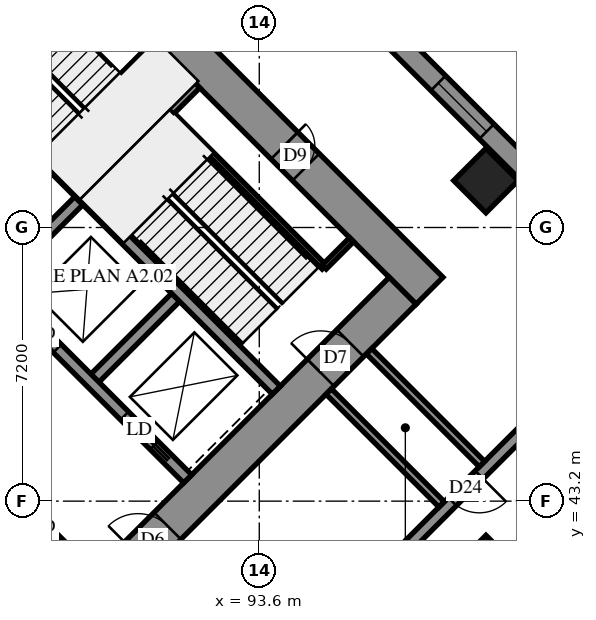
"""IFC4 building model, lengths in metres.
Left out: names, types, materials, properties, quantities, classifications, styles, units other than length and angle.
Written with IfcOpenShell. Run it as: python <this file> out.ifc"""

import sys

from ifc_helpers import new_model, si_unit, direction, frame, frame_2d, origin, origin_2d, place, context, subcontext, project, spatial, polyline, rectangle, outline, extrude, element, fill, save


model = new_model("IFC4")
c1 = context("Model", 3, precision=1e-05, world=origin(), true_north=direction((0.0, 1.0)))
c2 = subcontext(c1, "Body", "Model", "MODEL_VIEW")
j1 = project(units=[si_unit("LENGTHUNIT", "METRE"), si_unit("PLANEANGLEUNIT", "RADIAN")], contexts=[c1])
p1 = place(None, origin())
s1 = spatial("IfcSite", under=j1, at=p1, CompositionType="ELEMENT")
p2 = place(p1, origin())
s2 = spatial("IfcBuilding", under=s1, at=p2, CompositionType="ELEMENT")
p3 = place(p2, origin())
s3 = spatial("IfcBuildingStorey", under=s2, at=p3, CompositionType="ELEMENT", Elevation=0.0)
for number, where, z_axis, x_axis in (
    (1, (99.565, 51.635, 0.0), (0.0, 0.0, 1.0), (0.707, -0.707, 0.0)),
    (2, (99.565, 41.453, 0.0), (0.0, 0.0, 1.0), (0.707, -0.707, 0.0)),
):
    element("IfcColumn", number, at=place(p3, frame(where, z_axis=z_axis, x_axis=x_axis)), inside=s3, PredefinedType="COLUMN", context=c2, shape_type="SweptSolid", body=[
        extrude(rectangle(XDim=1.2, YDim=1.2, at=origin_2d()), origin(), (0.0, 0.0, 1.0), 5.6),
    ])
p4 = place(p3, frame((86.483, 60.333, -0.4), z_axis=(0.0, 0.0, 1.0), x_axis=(0.70710983, -0.7071037324, 0.0)))
e3 = element("IfcWall", 3, at=p4, inside=s3, PredefinedType="SHEAR", context=c2, shape_type="SweptSolid", body=[
    extrude(rectangle(XDim=16.4, YDim=1.0, at=frame_2d((8.2, 0.0))), origin(), (0.0, 0.0, 1.0), 5.3),
])
p5 = place(p4, frame((11.0, 0.0, 0.4)))
e4 = element("IfcOpeningElement", 4, at=p5, cuts=e3, PredefinedType="OPENING", context=c2, shape_type="SweptSolid", body=[
    extrude(rectangle(XDim=0.8, YDim=2.1, at=frame_2d((0.4, 1.05))), frame((0.0, 0.51, 0.0), z_axis=(0.0, -1.0, 0.0), x_axis=(1.0, 0.0, 0.0)), (0.0, 0.0, 1.0), 1.02),
])
p6 = place(p3, frame((87.19, 38.554, -0.4), z_axis=(0.0, 0.0, 1.0), x_axis=(0.707103309, 0.7071102534, 0.0)))
e5 = element("IfcWall", 5, at=p6, inside=s3, PredefinedType="SHEAR", context=c2, shape_type="SweptSolid", body=[
    extrude(rectangle(XDim=14.4, YDim=1.0, at=frame_2d((7.2, 0.0))), origin(), (0.0, 0.0, 1.0), 5.3),
])
p7 = place(p6, frame((4.55, 0.0, 0.4)))
e6 = element("IfcOpeningElement", 6, at=p7, cuts=e5, PredefinedType="OPENING", context=c2, shape_type="SweptSolid", body=[
    extrude(rectangle(XDim=1.1, YDim=2.1, at=frame_2d((0.55, 1.05))), frame((0.0, 0.51, 0.0), z_axis=(0.0, -1.0, 0.0), x_axis=(1.0, 0.0, 0.0)), (0.0, 0.0, 1.0), 1.02),
])
p8 = place(p6, frame((11.35, 0.0, 0.4)))
e7 = element("IfcOpeningElement", 7, at=p8, cuts=e5, PredefinedType="OPENING", context=c2, shape_type="SweptSolid", body=[
    extrude(rectangle(XDim=1.1, YDim=2.1, at=frame_2d((0.55, 1.05))), frame((0.0, 0.51, 0.0), z_axis=(0.0, -1.0, 0.0), x_axis=(1.0, 0.0, 0.0)), (0.0, 0.0, 1.0), 1.02),
])
for number, where, z_axis, x_axis in (
    (8, (86.625, 48.878, 0.0), (0.0, 0.0, 1.0), (0.707, 0.707, 0.0)),
    (9, (89.17, 46.332, 0.0), (0.0, 0.0, 1.0), (0.707, 0.707, 0.0)),
):
    element("IfcWall", number, at=place(p3, frame(where, z_axis=z_axis, x_axis=x_axis)), inside=s3, PredefinedType="SOLIDWALL", context=c2, shape_type="SweptSolid", body=[
        extrude(rectangle(XDim=3.3, YDim=0.3, at=frame_2d((1.65, 0.0))), origin(), (0.0, 0.0, 1.0), 5.6),
    ])
p9 = place(p3, frame((78.988, 51.423, 0.0), z_axis=(0.0, 0.0, 1.0), x_axis=(0.7071067812, -0.7071067812, 0.0)))
e10 = element("IfcWall", 10, at=p9, inside=s3, PredefinedType="SOLIDWALL", context=c2, shape_type="SweptSolid", body=[
    extrude(rectangle(XDim=14.4, YDim=0.3, at=frame_2d((7.2, 0.0))), origin(), (0.0, 0.0, 1.0), 5.6),
])
p10 = place(p9, frame((1.25, 0.0, 0.0)))
e11 = element("IfcOpeningElement", 11, at=p10, cuts=e10, PredefinedType="OPENING", context=c2, shape_type="SweptSolid", body=[
    extrude(rectangle(XDim=1.1, YDim=2.1, at=frame_2d((0.55, 1.05))), frame((0.0, 0.16, 0.0), z_axis=(0.0, -1.0, 0.0), x_axis=(1.0, 0.0, 0.0)), (0.0, 0.0, 1.0), 0.32),
])
p11 = place(p9, frame((4.85, 0.0, 0.0)))
e12 = element("IfcOpeningElement", 12, at=p11, cuts=e10, PredefinedType="OPENING", context=c2, shape_type="SweptSolid", body=[
    extrude(rectangle(XDim=1.1, YDim=2.1, at=frame_2d((0.55, 1.05))), frame((0.0, 0.16, 0.0), z_axis=(0.0, -1.0, 0.0), x_axis=(1.0, 0.0, 0.0)), (0.0, 0.0, 1.0), 0.32),
])
p12 = place(p9, frame((8.45, 0.0, 0.0)))
e13 = element("IfcOpeningElement", 13, at=p12, cuts=e10, PredefinedType="OPENING", context=c2, shape_type="SweptSolid", body=[
    extrude(rectangle(XDim=1.1, YDim=2.1, at=frame_2d((0.55, 1.05))), frame((0.0, 0.16, 0.0), z_axis=(0.0, -1.0, 0.0), x_axis=(1.0, 0.0, 0.0)), (0.0, 0.0, 1.0), 0.32),
])
p13 = place(p9, frame((12.05, 0.0, 0.0)))
e14 = element("IfcOpeningElement", 14, at=p13, cuts=e10, PredefinedType="OPENING", context=c2, shape_type="SweptSolid", body=[
    extrude(rectangle(XDim=1.1, YDim=2.1, at=frame_2d((0.55, 1.05))), frame((0.0, 0.16, 0.0), z_axis=(0.0, -1.0, 0.0), x_axis=(1.0, 0.0, 0.0)), (0.0, 0.0, 1.0), 0.32),
])
p14 = place(p3, frame((81.534, 53.969, 0.0), z_axis=(0.0, 0.0, 1.0), x_axis=(0.707103309, -0.7071102534, 0.0)))
e15 = element("IfcWall", 15, at=p14, inside=s3, PredefinedType="SOLIDWALL", context=c2, shape_type="SweptSolid", body=[
    extrude(rectangle(XDim=14.4, YDim=0.3, at=frame_2d((7.2, 0.0))), origin(), (0.0, 0.0, 1.0), 5.6),
])
p15 = place(p14, frame((1.25, 0.0, 0.0)))
e16 = element("IfcOpeningElement", 16, at=p15, cuts=e15, PredefinedType="OPENING", context=c2, shape_type="SweptSolid", body=[
    extrude(rectangle(XDim=1.1, YDim=2.1, at=frame_2d((0.55, 1.05))), frame((0.0, 0.16, 0.0), z_axis=(0.0, -1.0, 0.0), x_axis=(1.0, 0.0, 0.0)), (0.0, 0.0, 1.0), 0.32),
])
p16 = place(p14, frame((4.85, 0.0, 0.0)))
e17 = element("IfcOpeningElement", 17, at=p16, cuts=e15, PredefinedType="OPENING", context=c2, shape_type="SweptSolid", body=[
    extrude(rectangle(XDim=1.1, YDim=2.1, at=frame_2d((0.55, 1.05))), frame((0.0, 0.16, 0.0), z_axis=(0.0, -1.0, 0.0), x_axis=(1.0, 0.0, 0.0)), (0.0, 0.0, 1.0), 0.32),
])
p17 = place(p14, frame((8.45, 0.0, 0.0)))
e18 = element("IfcOpeningElement", 18, at=p17, cuts=e15, PredefinedType="OPENING", context=c2, shape_type="SweptSolid", body=[
    extrude(rectangle(XDim=1.1, YDim=2.1, at=frame_2d((0.55, 1.05))), frame((0.0, 0.16, 0.0), z_axis=(0.0, -1.0, 0.0), x_axis=(1.0, 0.0, 0.0)), (0.0, 0.0, 1.0), 0.32),
])
p18 = place(p14, frame((12.05, 0.0, 0.0)))
e19 = element("IfcOpeningElement", 19, at=p18, cuts=e15, PredefinedType="OPENING", context=c2, shape_type="SweptSolid", body=[
    extrude(rectangle(XDim=1.1, YDim=2.1, at=frame_2d((0.55, 1.05))), frame((0.0, 0.16, 0.0), z_axis=(0.0, -1.0, 0.0), x_axis=(1.0, 0.0, 0.0)), (0.0, 0.0, 1.0), 0.32),
])
for number, where, z_axis, x_axis in (
    (20, (83.867, 56.302, 0.0), (0.0, 0.0, 1.0), (0.707, -0.707, 0.0)),
    (21, (88.958, 51.211, 0.0), (0.0, 0.0, 1.0), (0.707, -0.707, 0.0)),
):
    element("IfcWall", number, at=place(p3, frame(where, z_axis=z_axis, x_axis=x_axis)), inside=s3, PredefinedType="SOLIDWALL", context=c2, shape_type="SweptSolid", body=[
        extrude(rectangle(XDim=7.2, YDim=0.3, at=frame_2d((3.6, 0.0))), origin(), (0.0, 0.0, 1.0), 5.6),
    ])
p19 = place(p3, frame((88.958, 51.211, 0.0), z_axis=(0.0, 0.0, 1.0), x_axis=(0.7071067812, 0.7071067812, 0.0)))
e22 = element("IfcWall", 22, at=p19, inside=s3, PredefinedType="SOLIDWALL", context=c2, shape_type="SweptSolid", body=[
    extrude(rectangle(XDim=4.2, YDim=0.3, at=frame_2d((2.1, 0.0))), origin(), (0.0, 0.0, 1.0), 5.6),
])
p20 = place(p3, frame((117.843, 34.665, 0.0), z_axis=(0.0, 0.0, 1.0), x_axis=(-0.7071067812, 0.7071067812, 0.0)))
e23 = element("IfcWall", 23, at=p20, inside=s3, PredefinedType="SOLIDWALL", context=c2, shape_type="SweptSolid", body=[
    extrude(outline(polyline([(-0.275, -0.275), (54.222, -0.275), (53.994, 0.275), (0.275, 0.275), (-0.275, -0.275)])), origin(), (0.0, 0.0, 1.0), 5.6),
])
p21 = place(p20, frame((0.8, 0.0, 0.7)))
e24 = element("IfcOpeningElement", 24, at=p21, cuts=e23, PredefinedType="OPENING", context=c2, shape_type="SweptSolid", body=[
    extrude(rectangle(XDim=1.8, YDim=3.4, at=frame_2d((0.9, 1.7))), frame((0.0, 0.285, 0.0), z_axis=(0.0, -1.0, 0.0), x_axis=(1.0, 0.0, 0.0)), (0.0, 0.0, 1.0), 0.57),
])
p22 = place(p20, frame((4.225, 0.0, 0.7)))
e25 = element("IfcOpeningElement", 25, at=p22, cuts=e23, PredefinedType="OPENING", context=c2, shape_type="SweptSolid", body=[
    extrude(rectangle(XDim=1.8, YDim=3.4, at=frame_2d((0.9, 1.7))), frame((0.0, 0.285, 0.0), z_axis=(0.0, -1.0, 0.0), x_axis=(1.0, 0.0, 0.0)), (0.0, 0.0, 1.0), 0.57),
])
p23 = place(p20, frame((7.825, 0.0, 0.7)))
e26 = element("IfcOpeningElement", 26, at=p23, cuts=e23, PredefinedType="OPENING", context=c2, shape_type="SweptSolid", body=[
    extrude(rectangle(XDim=1.8, YDim=3.4, at=frame_2d((0.9, 1.7))), frame((0.0, 0.285, 0.0), z_axis=(0.0, -1.0, 0.0), x_axis=(1.0, 0.0, 0.0)), (0.0, 0.0, 1.0), 0.57),
])
p24 = place(p20, frame((11.425, 0.0, 0.7)))
e27 = element("IfcOpeningElement", 27, at=p24, cuts=e23, PredefinedType="OPENING", context=c2, shape_type="SweptSolid", body=[
    extrude(rectangle(XDim=1.8, YDim=3.4, at=frame_2d((0.9, 1.7))), frame((0.0, 0.285, 0.0), z_axis=(0.0, -1.0, 0.0), x_axis=(1.0, 0.0, 0.0)), (0.0, 0.0, 1.0), 0.57),
])
p25 = place(p20, frame((15.025, 0.0, 0.7)))
e28 = element("IfcOpeningElement", 28, at=p25, cuts=e23, PredefinedType="OPENING", context=c2, shape_type="SweptSolid", body=[
    extrude(rectangle(XDim=1.8, YDim=3.4, at=frame_2d((0.9, 1.7))), frame((0.0, 0.285, 0.0), z_axis=(0.0, -1.0, 0.0), x_axis=(1.0, 0.0, 0.0)), (0.0, 0.0, 1.0), 0.57),
])
p26 = place(p20, frame((22.225, 0.0, 0.7)))
e29 = element("IfcOpeningElement", 29, at=p26, cuts=e23, PredefinedType="OPENING", context=c2, shape_type="SweptSolid", body=[
    extrude(rectangle(XDim=1.8, YDim=3.4, at=frame_2d((0.9, 1.7))), frame((0.0, 0.285, 0.0), z_axis=(0.0, -1.0, 0.0), x_axis=(1.0, 0.0, 0.0)), (0.0, 0.0, 1.0), 0.57),
])
p27 = place(p20, frame((25.825, 0.0, 0.7)))
e30 = element("IfcOpeningElement", 30, at=p27, cuts=e23, PredefinedType="OPENING", context=c2, shape_type="SweptSolid", body=[
    extrude(rectangle(XDim=1.8, YDim=3.4, at=frame_2d((0.9, 1.7))), frame((0.0, 0.285, 0.0), z_axis=(0.0, -1.0, 0.0), x_axis=(1.0, 0.0, 0.0)), (0.0, 0.0, 1.0), 0.57),
])
p28 = place(p20, frame((29.425, 0.0, 0.7)))
e31 = element("IfcOpeningElement", 31, at=p28, cuts=e23, PredefinedType="OPENING", context=c2, shape_type="SweptSolid", body=[
    extrude(rectangle(XDim=1.8, YDim=3.4, at=frame_2d((0.9, 1.7))), frame((0.0, 0.285, 0.0), z_axis=(0.0, -1.0, 0.0), x_axis=(1.0, 0.0, 0.0)), (0.0, 0.0, 1.0), 0.57),
])
p29 = place(p20, frame((33.025, 0.0, 0.7)))
e32 = element("IfcOpeningElement", 32, at=p29, cuts=e23, PredefinedType="OPENING", context=c2, shape_type="SweptSolid", body=[
    extrude(rectangle(XDim=1.8, YDim=3.4, at=frame_2d((0.9, 1.7))), frame((0.0, 0.285, 0.0), z_axis=(0.0, -1.0, 0.0), x_axis=(1.0, 0.0, 0.0)), (0.0, 0.0, 1.0), 0.57),
])
p30 = place(p20, frame((36.625, 0.0, 0.7)))
e33 = element("IfcOpeningElement", 33, at=p30, cuts=e23, PredefinedType="OPENING", context=c2, shape_type="SweptSolid", body=[
    extrude(rectangle(XDim=1.8, YDim=3.4, at=frame_2d((0.9, 1.7))), frame((0.0, 0.285, 0.0), z_axis=(0.0, -1.0, 0.0), x_axis=(1.0, 0.0, 0.0)), (0.0, 0.0, 1.0), 0.57),
])
p31 = place(p20, frame((40.225, 0.0, 0.7)))
e34 = element("IfcOpeningElement", 34, at=p31, cuts=e23, PredefinedType="OPENING", context=c2, shape_type="SweptSolid", body=[
    extrude(rectangle(XDim=1.8, YDim=3.4, at=frame_2d((0.9, 1.7))), frame((0.0, 0.285, 0.0), z_axis=(0.0, -1.0, 0.0), x_axis=(1.0, 0.0, 0.0)), (0.0, 0.0, 1.0), 0.57),
])
p32 = place(p20, frame((47.425, 0.0, 0.7)))
e35 = element("IfcOpeningElement", 35, at=p32, cuts=e23, PredefinedType="OPENING", context=c2, shape_type="SweptSolid", body=[
    extrude(rectangle(XDim=1.8, YDim=3.4, at=frame_2d((0.9, 1.7))), frame((0.0, 0.285, 0.0), z_axis=(0.0, -1.0, 0.0), x_axis=(1.0, 0.0, 0.0)), (0.0, 0.0, 1.0), 0.57),
])
p33 = place(p20, frame((51.06, 0.0, 0.7)))
e36 = element("IfcOpeningElement", 36, at=p33, cuts=e23, PredefinedType="OPENING", context=c2, shape_type="SweptSolid", body=[
    extrude(rectangle(XDim=1.8, YDim=3.4, at=frame_2d((0.9, 1.7))), frame((0.0, 0.285, 0.0), z_axis=(0.0, -1.0, 0.0), x_axis=(1.0, 0.0, 0.0)), (0.0, 0.0, 1.0), 0.57),
])
p34 = place(p3, frame((77.07, 42.275, 0.0), z_axis=(0.0, 0.0, 1.0), x_axis=(0.7071067812, -0.7071067812, 0.0)))
e37 = element("IfcWall", 37, at=p34, inside=s3, PredefinedType="SOLIDWALL", context=c2, shape_type="SweptSolid", body=[
    extrude(outline(polyline([(0.114, -0.275), (39.288, -0.275), (38.737, 0.275), (-0.114, 0.275), (0.114, -0.275)])), origin(), (0.0, 0.0, 1.0), 5.6),
])
p35 = place(p34, frame((2.837, 0.0, 0.7)))
e38 = element("IfcOpeningElement", 38, at=p35, cuts=e37, PredefinedType="OPENING", context=c2, shape_type="SweptSolid", body=[
    extrude(rectangle(XDim=1.8, YDim=3.4, at=frame_2d((0.9, 1.7))), frame((0.0, 0.285, 0.0), z_axis=(0.0, -1.0, 0.0), x_axis=(1.0, 0.0, 0.0)), (0.0, 0.0, 1.0), 0.57),
])
p36 = place(p34, frame((6.588, 0.0, 0.7)))
e39 = element("IfcOpeningElement", 39, at=p36, cuts=e37, PredefinedType="OPENING", context=c2, shape_type="SweptSolid", body=[
    extrude(rectangle(XDim=1.8, YDim=3.4, at=frame_2d((0.9, 1.7))), frame((0.0, 0.285, 0.0), z_axis=(0.0, -1.0, 0.0), x_axis=(1.0, 0.0, 0.0)), (0.0, 0.0, 1.0), 0.57),
])
p37 = place(p34, frame((10.188, 0.0, 0.7)))
e40 = element("IfcOpeningElement", 40, at=p37, cuts=e37, PredefinedType="OPENING", context=c2, shape_type="SweptSolid", body=[
    extrude(rectangle(XDim=1.8, YDim=3.4, at=frame_2d((0.9, 1.7))), frame((0.0, 0.285, 0.0), z_axis=(0.0, -1.0, 0.0), x_axis=(1.0, 0.0, 0.0)), (0.0, 0.0, 1.0), 0.57),
])
p38 = place(p34, frame((17.387, 0.0, 0.7)))
e41 = element("IfcOpeningElement", 41, at=p38, cuts=e37, PredefinedType="OPENING", context=c2, shape_type="SweptSolid", body=[
    extrude(rectangle(XDim=1.8, YDim=3.4, at=frame_2d((0.9, 1.7))), frame((0.0, 0.285, 0.0), z_axis=(0.0, -1.0, 0.0), x_axis=(1.0, 0.0, 0.0)), (0.0, 0.0, 1.0), 0.57),
])
p39 = place(p34, frame((20.988, 0.0, 0.7)))
e42 = element("IfcOpeningElement", 42, at=p39, cuts=e37, PredefinedType="OPENING", context=c2, shape_type="SweptSolid", body=[
    extrude(rectangle(XDim=1.8, YDim=3.4, at=frame_2d((0.9, 1.7))), frame((0.0, 0.285, 0.0), z_axis=(0.0, -1.0, 0.0), x_axis=(1.0, 0.0, 0.0)), (0.0, 0.0, 1.0), 0.57),
])
p40 = place(p34, frame((24.587, 0.0, 0.7)))
e43 = element("IfcOpeningElement", 43, at=p40, cuts=e37, PredefinedType="OPENING", context=c2, shape_type="SweptSolid", body=[
    extrude(rectangle(XDim=1.8, YDim=3.4, at=frame_2d((0.9, 1.7))), frame((0.0, 0.285, 0.0), z_axis=(0.0, -1.0, 0.0), x_axis=(1.0, 0.0, 0.0)), (0.0, 0.0, 1.0), 0.57),
])
p41 = place(p34, frame((28.188, 0.0, 0.7)))
e44 = element("IfcOpeningElement", 44, at=p41, cuts=e37, PredefinedType="OPENING", context=c2, shape_type="SweptSolid", body=[
    extrude(rectangle(XDim=1.8, YDim=3.4, at=frame_2d((0.9, 1.7))), frame((0.0, 0.285, 0.0), z_axis=(0.0, -1.0, 0.0), x_axis=(1.0, 0.0, 0.0)), (0.0, 0.0, 1.0), 0.57),
])
p42 = place(p34, frame((31.788, 0.0, 0.7)))
e45 = element("IfcOpeningElement", 45, at=p42, cuts=e37, PredefinedType="OPENING", context=c2, shape_type="SweptSolid", body=[
    extrude(rectangle(XDim=1.8, YDim=3.4, at=frame_2d((0.9, 1.7))), frame((0.0, 0.285, 0.0), z_axis=(0.0, -1.0, 0.0), x_axis=(1.0, 0.0, 0.0)), (0.0, 0.0, 1.0), 0.57),
])
p43 = place(p34, frame((35.388, 0.0, 0.7)))
e46 = element("IfcOpeningElement", 46, at=p43, cuts=e37, PredefinedType="OPENING", context=c2, shape_type="SweptSolid", body=[
    extrude(rectangle(XDim=1.8, YDim=3.4, at=frame_2d((0.9, 1.7))), frame((0.0, 0.285, 0.0), z_axis=(0.0, -1.0, 0.0), x_axis=(1.0, 0.0, 0.0)), (0.0, 0.0, 1.0), 0.57),
])
p44 = place(p3, frame((91.313, 53.354, 0.0), z_axis=(0.0, 0.0, 1.0), x_axis=(0.7071067812, -0.7071067812, 0.0)))
e47 = element("IfcWall", 47, at=p44, inside=s3, PredefinedType="PARTITIONING", context=c2, shape_type="SweptSolid", body=[
    extrude(rectangle(XDim=5.65, YDim=0.15, at=frame_2d((2.825, 0.0))), origin(), (0.0, 0.0, 1.0), 5.6),
])
p45 = place(p3, frame((95.308, 49.358, 0.0), z_axis=(0.0, 0.0, 1.0), x_axis=(0.70705776, 0.707155799, 0.0)))
e48 = element("IfcWall", 48, at=p45, inside=s3, PredefinedType="PARTITIONING", context=c2, shape_type="SweptSolid", body=[
    extrude(rectangle(XDim=1.02, YDim=0.15, at=frame_2d((0.51, 0.0))), origin(), (0.0, 0.0, 1.0), 5.6),
])
p46 = place(p3, frame((104.055, 48.559, 0.0), z_axis=(0.0, 0.0, 1.0), x_axis=(-0.7071067812, -0.7071067812, 0.0)))
e49 = element("IfcWall", 49, at=p46, inside=s3, PredefinedType="PARTITIONING", context=c2, shape_type="SweptSolid", body=[
    extrude(rectangle(XDim=23.6, YDim=0.3, at=frame_2d((11.8, 0.0))), origin(), (0.0, 0.0, 1.0), 5.6),
])
p47 = place(p46, frame((10.8, 0.0, 0.0)))
e50 = element("IfcOpeningElement", 50, at=p47, cuts=e49, PredefinedType="OPENING", context=c2, shape_type="SweptSolid", body=[
    extrude(rectangle(XDim=1.8, YDim=2.4, at=frame_2d((0.9, 1.2))), frame((0.0, 0.16, 0.0), z_axis=(0.0, -1.0, 0.0), x_axis=(1.0, 0.0, 0.0)), (0.0, 0.0, 1.0), 0.32),
])
p48 = place(p46, frame((18.0, 0.0, 0.0)))
e51 = element("IfcOpeningElement", 51, at=p48, cuts=e49, PredefinedType="OPENING", context=c2, shape_type="SweptSolid", body=[
    extrude(rectangle(XDim=1.8, YDim=2.4, at=frame_2d((0.9, 1.2))), frame((0.0, 0.16, 0.0), z_axis=(0.0, -1.0, 0.0), x_axis=(1.0, 0.0, 0.0)), (0.0, 0.0, 1.0), 0.32),
])
p49 = place(p46, frame((6.6, 0.0, 0.0)))
e52 = element("IfcOpeningElement", 52, at=p49, cuts=e49, PredefinedType="OPENING", context=c2, shape_type="SweptSolid", body=[
    extrude(rectangle(XDim=1.0, YDim=2.1, at=frame_2d((0.5, 1.05))), frame((0.0, 0.16, 0.0), z_axis=(0.0, -1.0, 0.0), x_axis=(1.0, 0.0, 0.0)), (0.0, 0.0, 1.0), 0.32),
])
p50 = place(p3, frame((96.489, 47.145, 0.0), z_axis=(0.0, 0.0, 1.0), x_axis=(0.7070948763, -0.7071186858, 0.0)))
e53 = element("IfcWall", 53, at=p50, inside=s3, PredefinedType="PARTITIONING", context=c2, shape_type="SweptSolid", body=[
    extrude(rectangle(XDim=4.2, YDim=0.2, at=frame_2d((2.1, 0.0))), origin(), (0.0, 0.0, 1.0), 5.6),
])
p51 = place(p3, frame((95.428, 46.084, 0.0), z_axis=(0.0, 0.0, 1.0), x_axis=(0.7071067812, -0.7071067812, 0.0)))
e54 = element("IfcWall", 54, at=p51, inside=s3, PredefinedType="PARTITIONING", context=c2, shape_type="SweptSolid", body=[
    extrude(rectangle(XDim=4.2, YDim=0.2, at=frame_2d((2.1, 0.0))), origin(), (0.0, 0.0, 1.0), 5.6),
])
p52 = place(p27, origin())
e55 = element("IfcWindow", 55, at=p52, inside=s3, PartitioningType="SINGLE_PANEL", PredefinedType="WINDOW", context=c2, shape_type="SweptSolid", body=[
    extrude(rectangle(XDim=1.8, YDim=3.4, at=frame_2d((0.9, 1.7))), frame((0.0, 0.155, 0.0), z_axis=(0.0, -1.0, 0.0), x_axis=(1.0, 0.0, 0.0)), (0.0, 0.0, 1.0), 0.06),
])
fill(e30, e55)
p53 = place(p5, origin())
e56 = element("IfcDoor", 56, at=p53, inside=s3, OperationType="SINGLE_SWING_RIGHT", PredefinedType="DOOR", context=c2, shape_type="SweptSolid", body=[
    extrude(rectangle(XDim=0.8, YDim=2.1, at=frame_2d((0.4, 1.05))), frame((0.0, -0.44, 0.0), z_axis=(0.0, -1.0, 0.0), x_axis=(1.0, 0.0, 0.0)), (0.0, 0.0, 1.0), 0.05),
])
fill(e4, e56)
p54 = place(p7, origin())
e57 = element("IfcDoor", 57, at=p54, inside=s3, OperationType="DOUBLE_DOOR_SINGLE_SWING", PredefinedType="DOOR", context=c2, shape_type="SweptSolid", body=[
    extrude(rectangle(XDim=1.1, YDim=2.1, at=frame_2d((0.55, 1.05))), frame((0.0, 0.025, 0.0), z_axis=(0.0, -1.0, 0.0), x_axis=(1.0, 0.0, 0.0)), (0.0, 0.0, 1.0), 0.05),
])
fill(e6, e57)
p55 = place(p8, origin())
e58 = element("IfcDoor", 58, at=p55, inside=s3, OperationType="SINGLE_SWING_RIGHT", PredefinedType="DOOR", context=c2, shape_type="SweptSolid", body=[
    extrude(rectangle(XDim=1.1, YDim=2.1, at=frame_2d((0.55, 1.05))), frame((0.0, 0.025, 0.0), z_axis=(0.0, -1.0, 0.0), x_axis=(1.0, 0.0, 0.0)), (0.0, 0.0, 1.0), 0.05),
])
fill(e7, e58)
p56 = place(p13, origin())
e59 = element("IfcDoor", 59, at=p56, inside=s3, OperationType="SLIDING_TO_RIGHT", PredefinedType="DOOR", context=c2, shape_type="SweptSolid", body=[
    extrude(rectangle(XDim=1.1, YDim=2.1, at=frame_2d((0.55, 1.05))), frame((0.0, 0.025, 0.0), z_axis=(0.0, -1.0, 0.0), x_axis=(1.0, 0.0, 0.0)), (0.0, 0.0, 1.0), 0.05),
])
fill(e14, e59)
p57 = place(p17, origin())
e60 = element("IfcDoor", 60, at=p57, inside=s3, OperationType="SLIDING_TO_LEFT", PredefinedType="DOOR", context=c2, shape_type="SweptSolid", body=[
    extrude(rectangle(XDim=1.1, YDim=2.1, at=frame_2d((0.55, 1.05))), frame((0.0, 0.025, 0.0), z_axis=(0.0, -1.0, 0.0), x_axis=(1.0, 0.0, 0.0)), (0.0, 0.0, 1.0), 0.05),
])
fill(e18, e60)
p58 = place(p18, origin())
e61 = element("IfcDoor", 61, at=p58, inside=s3, OperationType="SLIDING_TO_RIGHT", PredefinedType="DOOR", context=c2, shape_type="SweptSolid", body=[
    extrude(rectangle(XDim=1.1, YDim=2.1, at=frame_2d((0.55, 1.05))), frame((0.0, 0.025, 0.0), z_axis=(0.0, -1.0, 0.0), x_axis=(1.0, 0.0, 0.0)), (0.0, 0.0, 1.0), 0.05),
])
fill(e19, e61)
p59 = place(p49, origin())
e62 = element("IfcDoor", 62, at=p59, inside=s3, OperationType="SINGLE_SWING_RIGHT", PredefinedType="DOOR", context=c2, shape_type="SweptSolid", body=[
    extrude(rectangle(XDim=1.0, YDim=2.1, at=frame_2d((0.5, 1.05))), frame((0.0, 0.025, 0.0), z_axis=(0.0, -1.0, 0.0), x_axis=(1.0, 0.0, 0.0)), (0.0, 0.0, 1.0), 0.05),
])
fill(e52, e62)
save(model, sys.argv[1])
